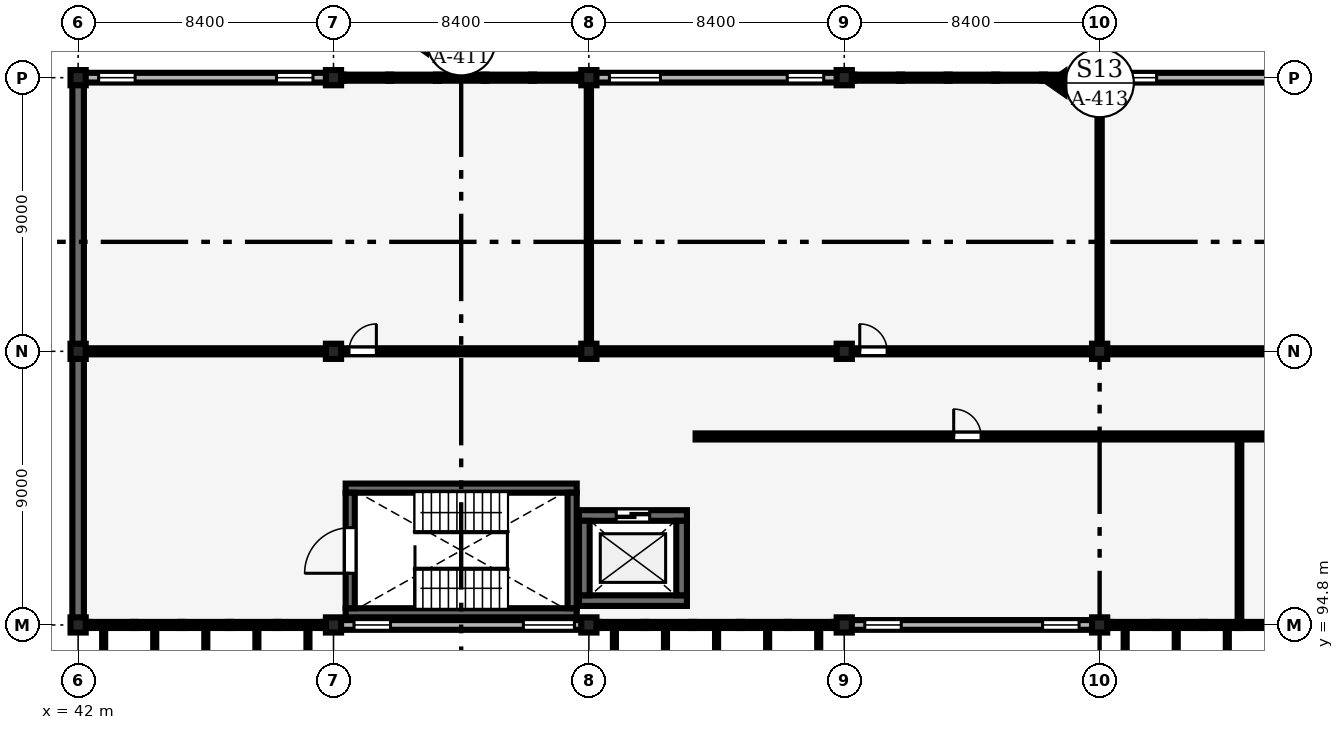
"""IFC4 building model, lengths in metres.
Left out: names, types, materials, properties, quantities, classifications, styles, units other than length and angle.
Written with IfcOpenShell. Run it as: python <this file> out.ifc"""

import sys

from ifc_helpers import new_model, si_unit, direction, frame, frame_2d, origin, origin_2d, place, context, subcontext, project, spatial, rectangle, extrude, element, fill, save


model = new_model("IFC4")
c1 = context("Model", 3, precision=1e-05, world=origin(), true_north=direction((0.0, 1.0)))
c2 = subcontext(c1, "Body", "Model", "MODEL_VIEW")
j1 = project(units=[si_unit("LENGTHUNIT", "METRE"), si_unit("PLANEANGLEUNIT", "RADIAN")], contexts=[c1])
p1 = place(None, origin())
s1 = spatial("IfcSite", under=j1, at=p1, CompositionType="ELEMENT")
p2 = place(p1, origin())
s2 = spatial("IfcBuilding", under=s1, at=p2, CompositionType="ELEMENT")
p3 = place(p2, frame((0.0, 0.0, 13.2)))
s3 = spatial("IfcBuildingStorey", under=s2, at=p3, CompositionType="ELEMENT", Elevation=13.2)
for number, where, z_axis, x_axis in (
    (1, (42.0, 94.8, 0.0), (0.0, 0.0, 1.0), (1.0, 0.0, 0.0)),
    (2, (42.0, 103.8, 0.0), (0.0, 0.0, 1.0), (1.0, 0.0, 0.0)),
    (3, (42.0, 112.8, 0.0), (0.0, 0.0, 1.0), (1.0, 0.0, 0.0)),
    (4, (50.4, 94.8, 0.0), (0.0, 0.0, 1.0), (1.0, 0.0, 0.0)),
    (5, (50.4, 103.8, 0.0), (0.0, 0.0, 1.0), (1.0, 0.0, 0.0)),
    (6, (50.4, 112.8, 0.0), (0.0, 0.0, 1.0), (1.0, 0.0, 0.0)),
    (7, (58.8, 94.8, 0.0), (0.0, 0.0, 1.0), (1.0, 0.0, 0.0)),
    (8, (58.8, 103.8, 0.0), (0.0, 0.0, 1.0), (1.0, 0.0, 0.0)),
    (9, (58.8, 112.8, 0.0), (0.0, 0.0, 1.0), (1.0, 0.0, 0.0)),
    (10, (67.2, 94.8, 0.0), (0.0, 0.0, 1.0), (1.0, 0.0, 0.0)),
    (11, (67.2, 103.8, 0.0), (0.0, 0.0, 1.0), (1.0, 0.0, 0.0)),
    (12, (67.2, 112.8, 0.0), (0.0, 0.0, 1.0), (1.0, 0.0, 0.0)),
    (13, (75.6, 94.8, 0.0), (0.0, 0.0, 1.0), (1.0, 0.0, 0.0)),
    (14, (75.6, 103.8, 0.0), (0.0, 0.0, 1.0), (1.0, 0.0, 0.0)),
    (15, (75.6, 112.8, 0.0), (0.0, 0.0, 1.0), (1.0, 0.0, 0.0)),
):
    element("IfcColumn", number, at=place(p3, frame(where, z_axis=z_axis, x_axis=x_axis)), inside=s3, PredefinedType="COLUMN", context=c2, shape_type="SweptSolid", body=[
        extrude(rectangle(XDim=0.5, YDim=0.5, at=origin_2d()), origin(), (0.0, 0.0, 1.0), 4.2),
    ])
p4 = place(p3, frame((42.225, 112.8, 0.0), z_axis=(0.0, 0.0, 1.0), x_axis=(1.0, 0.0, 0.0)))
e16 = element("IfcWall", 16, at=p4, inside=s3, PredefinedType="SOLIDWALL", context=c2, shape_type="SweptSolid", body=[
    extrude(rectangle(XDim=7.95, YDim=0.32, at=frame_2d((3.975, 0.0))), origin(), (0.0, 0.0, 1.0), 3.11),
])
p5 = place(p4, frame((0.45, 0.0, 0.9)))
e17 = element("IfcOpeningElement", 17, at=p5, cuts=e16, PredefinedType="OPENING", context=c2, shape_type="SweptSolid", body=[
    extrude(rectangle(XDim=1.2, YDim=1.5, at=frame_2d((0.6, 0.75))), frame((0.0, 0.17, 0.0), z_axis=(0.0, -1.0, 0.0), x_axis=(1.0, 0.0, 0.0)), (0.0, 0.0, 1.0), 0.34),
])
p6 = place(p4, frame((6.3, 0.0, 0.9)))
e18 = element("IfcOpeningElement", 18, at=p6, cuts=e16, PredefinedType="OPENING", context=c2, shape_type="SweptSolid", body=[
    extrude(rectangle(XDim=1.2, YDim=1.8, at=frame_2d((0.6, 0.9))), frame((0.0, 0.17, 0.0), z_axis=(0.0, -1.0, 0.0), x_axis=(1.0, 0.0, 0.0)), (0.0, 0.0, 1.0), 0.34),
])
p7 = place(p3, frame((59.025, 112.8, 0.0), z_axis=(0.0, 0.0, 1.0), x_axis=(1.0, 0.0, 0.0)))
e19 = element("IfcWall", 19, at=p7, inside=s3, PredefinedType="SOLIDWALL", context=c2, shape_type="SweptSolid", body=[
    extrude(rectangle(XDim=7.95, YDim=0.32, at=frame_2d((3.975, 0.0))), origin(), (0.0, 0.0, 1.0), 3.01),
])
p8 = place(p7, frame((0.45, 0.0, 0.9)))
e20 = element("IfcOpeningElement", 20, at=p8, cuts=e19, PredefinedType="OPENING", context=c2, shape_type="SweptSolid", body=[
    extrude(rectangle(XDim=1.68, YDim=1.96, at=frame_2d((0.84, 0.98))), frame((0.0, 0.17, 0.0), z_axis=(0.0, -1.0, 0.0), x_axis=(1.0, 0.0, 0.0)), (0.0, 0.0, 1.0), 0.34),
])
p9 = place(p7, frame((6.3, 0.0, 0.9)))
e21 = element("IfcOpeningElement", 21, at=p9, cuts=e19, PredefinedType="OPENING", context=c2, shape_type="SweptSolid", body=[
    extrude(rectangle(XDim=1.2, YDim=1.5, at=frame_2d((0.6, 0.75))), frame((0.0, 0.17, 0.0), z_axis=(0.0, -1.0, 0.0), x_axis=(1.0, 0.0, 0.0)), (0.0, 0.0, 1.0), 0.34),
])
p10 = place(p3, frame((75.825, 112.8, 0.0), z_axis=(0.0, 0.0, 1.0), x_axis=(1.0, 0.0, 0.0)))
e22 = element("IfcWall", 22, at=p10, inside=s3, PredefinedType="SOLIDWALL", context=c2, shape_type="SweptSolid", body=[
    extrude(rectangle(XDim=7.95, YDim=0.32, at=frame_2d((3.975, 0.0))), origin(), (0.0, 0.0, 1.0), 2.96),
])
p11 = place(p10, frame((0.45, 0.0, 0.9)))
e23 = element("IfcOpeningElement", 23, at=p11, cuts=e22, PredefinedType="OPENING", context=c2, shape_type="SweptSolid", body=[
    extrude(rectangle(XDim=1.2, YDim=1.8, at=frame_2d((0.6, 0.9))), frame((0.0, 0.17, 0.0), z_axis=(0.0, -1.0, 0.0), x_axis=(1.0, 0.0, 0.0)), (0.0, 0.0, 1.0), 0.34),
])
p12 = place(p10, frame((6.02, 0.0, 0.9)))
e24 = element("IfcOpeningElement", 24, at=p12, cuts=e22, PredefinedType="OPENING", context=c2, shape_type="SweptSolid", body=[
    extrude(rectangle(XDim=1.68, YDim=1.91, at=frame_2d((0.84, 0.955))), frame((0.0, 0.17, 0.0), z_axis=(0.0, -1.0, 0.0), x_axis=(1.0, 0.0, 0.0)), (0.0, 0.0, 1.0), 0.34),
])
p13 = place(p3, frame((42.0, 95.025, 0.0), z_axis=(0.0, 0.0, 1.0), x_axis=(0.0, 1.0, 0.0)))
e25 = element("IfcWall", 25, at=p13, inside=s3, PredefinedType="SHEAR", context=c2, shape_type="SweptSolid", body=[
    extrude(rectangle(XDim=8.55, YDim=0.38, at=frame_2d((4.275, 0.0))), origin(), (0.0, 0.0, 1.0), 3.01),
])
p14 = place(p3, frame((42.0, 104.025, 0.0), z_axis=(0.0, 0.0, 1.0), x_axis=(0.0, 1.0, 0.0)))
e26 = element("IfcWall", 26, at=p14, inside=s3, PredefinedType="SHEAR", context=c2, shape_type="SweptSolid", body=[
    extrude(rectangle(XDim=8.55, YDim=0.38, at=frame_2d((4.275, 0.0))), origin(), (0.0, 0.0, 1.0), 2.96),
])
p15 = place(p3, frame((50.625, 94.8, 0.0), z_axis=(0.0, 0.0, 1.0), x_axis=(1.0, 0.0, 0.0)))
e27 = element("IfcWall", 27, at=p15, inside=s3, PredefinedType="SOLIDWALL", context=c2, shape_type="SweptSolid", body=[
    extrude(rectangle(XDim=7.95, YDim=0.32, at=frame_2d((3.975, 0.0))), origin(), (0.0, 0.0, 1.0), 3.06),
])
p16 = place(p15, frame((0.45, 0.0, 0.9)))
e28 = element("IfcOpeningElement", 28, at=p16, cuts=e27, PredefinedType="OPENING", context=c2, shape_type="SweptSolid", body=[
    extrude(rectangle(XDim=1.2, YDim=1.8, at=frame_2d((0.6, 0.9))), frame((0.0, 0.17, 0.0), z_axis=(0.0, -1.0, 0.0), x_axis=(1.0, 0.0, 0.0)), (0.0, 0.0, 1.0), 0.34),
])
p17 = place(p15, frame((6.02, 0.0, 0.9)))
e29 = element("IfcOpeningElement", 29, at=p17, cuts=e27, PredefinedType="OPENING", context=c2, shape_type="SweptSolid", body=[
    extrude(rectangle(XDim=1.68, YDim=2.01, at=frame_2d((0.84, 1.005))), frame((0.0, 0.17, 0.0), z_axis=(0.0, -1.0, 0.0), x_axis=(1.0, 0.0, 0.0)), (0.0, 0.0, 1.0), 0.34),
])
p18 = place(p3, frame((67.425, 94.8, 0.0), z_axis=(0.0, 0.0, 1.0), x_axis=(1.0, 0.0, 0.0)))
e30 = element("IfcWall", 30, at=p18, inside=s3, PredefinedType="SOLIDWALL", context=c2, shape_type="SweptSolid", body=[
    extrude(rectangle(XDim=7.95, YDim=0.32, at=frame_2d((3.975, 0.0))), origin(), (0.0, 0.0, 1.0), 3.01),
])
p19 = place(p18, frame((0.45, 0.0, 0.9)))
e31 = element("IfcOpeningElement", 31, at=p19, cuts=e30, PredefinedType="OPENING", context=c2, shape_type="SweptSolid", body=[
    extrude(rectangle(XDim=1.2, YDim=1.5, at=frame_2d((0.6, 0.75))), frame((0.0, 0.17, 0.0), z_axis=(0.0, -1.0, 0.0), x_axis=(1.0, 0.0, 0.0)), (0.0, 0.0, 1.0), 0.34),
])
p20 = place(p18, frame((6.3, 0.0, 0.9)))
e32 = element("IfcOpeningElement", 32, at=p20, cuts=e30, PredefinedType="OPENING", context=c2, shape_type="SweptSolid", body=[
    extrude(rectangle(XDim=1.2, YDim=1.8, at=frame_2d((0.6, 0.9))), frame((0.0, 0.17, 0.0), z_axis=(0.0, -1.0, 0.0), x_axis=(1.0, 0.0, 0.0)), (0.0, 0.0, 1.0), 0.34),
])
for number, where, z_axis, x_axis in (
    (33, (50.8, 95.2, 0.0), (0.0, 0.0, 1.0), (1.0, 0.0, 0.0)),
    (34, (50.8, 99.3, 0.0), (0.0, 0.0, 1.0), (1.0, 0.0, 0.0)),
):
    element("IfcWall", number, at=place(p3, frame(where, z_axis=z_axis, x_axis=x_axis)), inside=s3, PredefinedType="SHEAR", context=c2, shape_type="SweptSolid", body=[
        extrude(rectangle(XDim=7.6, YDim=0.3, at=frame_2d((3.8, 0.0))), origin(), (0.0, 0.0, 1.0), 4.025),
    ])
p21 = place(p3, frame((50.95, 95.35, 0.0), z_axis=(0.0, 0.0, 1.0), x_axis=(0.0, 1.0, 0.0)))
e35 = element("IfcWall", 35, at=p21, inside=s3, PredefinedType="SHEAR", context=c2, shape_type="SweptSolid", body=[
    extrude(rectangle(XDim=3.8, YDim=0.3, at=frame_2d((1.9, 0.0))), origin(), (0.0, 0.0, 1.0), 4.025),
])
p22 = place(p21, frame((1.15, 0.0, 0.0)))
e36 = element("IfcOpeningElement", 36, at=p22, cuts=e35, PredefinedType="OPENING", context=c2, shape_type="SweptSolid", body=[
    extrude(rectangle(XDim=1.5, YDim=2.2, at=frame_2d((0.75, 1.1))), frame((0.0, 0.16, 0.0), z_axis=(0.0, -1.0, 0.0), x_axis=(1.0, 0.0, 0.0)), (0.0, 0.0, 1.0), 0.32),
])
p23 = place(p3, frame((58.25, 95.35, 0.0), z_axis=(0.0, 0.0, 1.0), x_axis=(0.0, 1.0, 0.0)))
e37 = element("IfcWall", 37, at=p23, inside=s3, PredefinedType="SHEAR", context=c2, shape_type="SweptSolid", body=[
    extrude(rectangle(XDim=3.8, YDim=0.3, at=frame_2d((1.9, 0.0))), origin(), (0.0, 0.0, 1.0), 4.025),
])
p24 = place(p3, frame((58.475, 95.6, 0.0), z_axis=(0.0, 0.0, 1.0), x_axis=(1.0, 0.0, 0.0)))
e38 = element("IfcWall", 38, at=p24, inside=s3, PredefinedType="SHEAR", context=c2, shape_type="SweptSolid", body=[
    extrude(rectangle(XDim=3.55, YDim=0.35, at=frame_2d((1.775, 0.0))), origin(), (0.0, 0.0, 1.0), 3.92),
])
p25 = place(p3, frame((58.475, 98.4, 0.0), z_axis=(0.0, 0.0, 1.0), x_axis=(1.0, 0.0, 0.0)))
e39 = element("IfcWall", 39, at=p25, inside=s3, PredefinedType="SHEAR", context=c2, shape_type="SweptSolid", body=[
    extrude(rectangle(XDim=3.55, YDim=0.35, at=frame_2d((1.775, 0.0))), origin(), (0.0, 0.0, 1.0), 3.92),
])
p26 = place(p25, frame((1.225, 0.0, 0.0)))
e40 = element("IfcOpeningElement", 40, at=p26, cuts=e39, PredefinedType="OPENING", context=c2, shape_type="SweptSolid", body=[
    extrude(rectangle(XDim=1.1, YDim=2.2, at=frame_2d((0.55, 1.1))), frame((0.0, 0.185, 0.0), z_axis=(0.0, -1.0, 0.0), x_axis=(1.0, 0.0, 0.0)), (0.0, 0.0, 1.0), 0.37),
])
for number, where, z_axis, x_axis in (
    (41, (58.65, 95.775, 0.0), (0.0, 0.0, 1.0), (0.0, 1.0, 0.0)),
    (42, (61.85, 95.775, 0.0), (0.0, 0.0, 1.0), (0.0, 1.0, 0.0)),
):
    element("IfcWall", number, at=place(p3, frame(where, z_axis=z_axis, x_axis=x_axis)), inside=s3, PredefinedType="SHEAR", context=c2, shape_type="SweptSolid", body=[
        extrude(rectangle(XDim=2.45, YDim=0.35, at=frame_2d((1.225, 0.0))), origin(), (0.0, 0.0, 1.0), 3.92),
    ])
p27 = place(p3, frame((58.8, 103.905, 0.0), z_axis=(0.0, 0.0, 1.0), x_axis=(0.0, 1.0, 0.0)))
e43 = element("IfcWall", 43, at=p27, inside=s3, PredefinedType="PARTITIONING", context=c2, shape_type="SweptSolid", body=[
    extrude(rectangle(XDim=8.79, YDim=0.14, at=frame_2d((4.395, 0.0))), origin(), (0.0, 0.0, 1.0), 3.01),
])
p28 = place(p3, frame((75.6, 103.905, 0.0), z_axis=(0.0, 0.0, 1.0), x_axis=(0.0, 1.0, 0.0)))
e44 = element("IfcWall", 44, at=p28, inside=s3, PredefinedType="PARTITIONING", context=c2, shape_type="SweptSolid", body=[
    extrude(rectangle(XDim=8.79, YDim=0.14, at=frame_2d((4.395, 0.0))), origin(), (0.0, 0.0, 1.0), 3.16),
])
p29 = place(p3, frame((42.195, 103.8, 0.0), z_axis=(0.0, 0.0, 1.0), x_axis=(1.0, 0.0, 0.0)))
e45 = element("IfcWall", 45, at=p29, inside=s3, PredefinedType="PARTITIONING", context=c2, shape_type="SweptSolid", body=[
    extrude(rectangle(XDim=7.945, YDim=0.2, at=frame_2d((3.972, 0.0))), origin(), (0.0, 0.0, 1.0), 3.31),
])
p30 = place(p3, frame((50.66, 103.8, 0.0), z_axis=(0.0, 0.0, 1.0), x_axis=(1.0, 0.0, 0.0)))
e46 = element("IfcWall", 46, at=p30, inside=s3, PredefinedType="PARTITIONING", context=c2, shape_type="SweptSolid", body=[
    extrude(rectangle(XDim=7.88, YDim=0.2, at=frame_2d((3.94, 0.0))), origin(), (0.0, 0.0, 1.0), 3.26),
])
p31 = place(p30, frame((0.25, 0.0, 0.0)))
e47 = element("IfcOpeningElement", 47, at=p31, cuts=e46, PredefinedType="OPENING", context=c2, shape_type="SweptSolid", body=[
    extrude(rectangle(XDim=0.9, YDim=2.1, at=frame_2d((0.45, 1.05))), frame((0.0, 0.11, 0.0), z_axis=(0.0, -1.0, 0.0), x_axis=(1.0, 0.0, 0.0)), (0.0, 0.0, 1.0), 0.22),
])
p32 = place(p3, frame((59.06, 103.8, 0.0), z_axis=(0.0, 0.0, 1.0), x_axis=(1.0, 0.0, 0.0)))
e48 = element("IfcWall", 48, at=p32, inside=s3, PredefinedType="PARTITIONING", context=c2, shape_type="SweptSolid", body=[
    extrude(rectangle(XDim=7.88, YDim=0.2, at=frame_2d((3.94, 0.0))), origin(), (0.0, 0.0, 1.0), 3.31),
])
p33 = place(p3, frame((67.46, 103.8, 0.0), z_axis=(0.0, 0.0, 1.0), x_axis=(1.0, 0.0, 0.0)))
e49 = element("IfcWall", 49, at=p33, inside=s3, PredefinedType="PARTITIONING", context=c2, shape_type="SweptSolid", body=[
    extrude(rectangle(XDim=7.88, YDim=0.2, at=frame_2d((3.94, 0.0))), origin(), (0.0, 0.0, 1.0), 3.26),
])
p34 = place(p33, frame((0.25, 0.0, 0.0)))
e50 = element("IfcOpeningElement", 50, at=p34, cuts=e49, PredefinedType="OPENING", context=c2, shape_type="SweptSolid", body=[
    extrude(rectangle(XDim=0.9, YDim=2.1, at=frame_2d((0.45, 1.05))), frame((0.0, 0.11, 0.0), z_axis=(0.0, -1.0, 0.0), x_axis=(1.0, 0.0, 0.0)), (0.0, 0.0, 1.0), 0.22),
])
p35 = place(p3, frame((75.86, 103.8, 0.0), z_axis=(0.0, 0.0, 1.0), x_axis=(1.0, 0.0, 0.0)))
e51 = element("IfcWall", 51, at=p35, inside=s3, PredefinedType="PARTITIONING", context=c2, shape_type="SweptSolid", body=[
    extrude(rectangle(XDim=7.88, YDim=0.2, at=frame_2d((3.94, 0.0))), origin(), (0.0, 0.0, 1.0), 3.21),
])
p36 = place(p35, frame((6.73, 0.0, 0.0)))
e52 = element("IfcOpeningElement", 52, at=p36, cuts=e51, PredefinedType="OPENING", context=c2, shape_type="SweptSolid", body=[
    extrude(rectangle(XDim=0.9, YDim=2.1, at=frame_2d((0.45, 1.05))), frame((0.0, 0.11, 0.0), z_axis=(0.0, -1.0, 0.0), x_axis=(1.0, 0.0, 0.0)), (0.0, 0.0, 1.0), 0.22),
])
p37 = place(p3, frame((80.2, 94.905, 0.0), z_axis=(0.0, 0.0, 1.0), x_axis=(0.0, 1.0, 0.0)))
e53 = element("IfcWall", 53, at=p37, inside=s3, PredefinedType="PARTITIONING", context=c2, shape_type="SweptSolid", body=[
    extrude(rectangle(XDim=5.99, YDim=0.12, at=frame_2d((2.995, 0.0))), origin(), (0.0, 0.0, 1.0), 3.9),
])
p38 = place(p3, frame((62.31, 101.0, 0.0), z_axis=(0.0, 0.0, 1.0), x_axis=(1.0, 0.0, 0.0)))
e54 = element("IfcWall", 54, at=p38, inside=s3, PredefinedType="PARTITIONING", context=c2, shape_type="SweptSolid", body=[
    extrude(rectangle(XDim=35.88, YDim=0.2, at=frame_2d((17.94, 0.0))), origin(), (0.0, 0.0, 1.0), 3.451),
])
p39 = place(p38, frame((8.49, 0.0, 0.0)))
e55 = element("IfcOpeningElement", 55, at=p39, cuts=e54, PredefinedType="OPENING", context=c2, shape_type="SweptSolid", body=[
    extrude(rectangle(XDim=0.9, YDim=2.1, at=frame_2d((0.45, 1.05))), frame((0.0, 0.11, 0.0), z_axis=(0.0, -1.0, 0.0), x_axis=(1.0, 0.0, 0.0)), (0.0, 0.0, 1.0), 0.22),
])
p40 = place(p38, frame((26.44, 0.0, 0.0)))
e56 = element("IfcOpeningElement", 56, at=p40, cuts=e54, PredefinedType="OPENING", context=c2, shape_type="SweptSolid", body=[
    extrude(rectangle(XDim=0.9, YDim=2.1, at=frame_2d((0.45, 1.05))), frame((0.0, 0.11, 0.0), z_axis=(0.0, -1.0, 0.0), x_axis=(1.0, 0.0, 0.0)), (0.0, 0.0, 1.0), 0.22),
])
p41 = place(p5, origin())
e57 = element("IfcWindow", 57, at=p41, inside=s3, PartitioningType="SINGLE_PANEL", PredefinedType="WINDOW", context=c2, shape_type="SweptSolid", body=[
    extrude(rectangle(XDim=1.2, YDim=1.5, at=frame_2d((0.6, 0.75))), frame((0.0, 0.03, 0.0), z_axis=(0.0, -1.0, 0.0), x_axis=(1.0, 0.0, 0.0)), (0.0, 0.0, 1.0), 0.06),
])
fill(e17, e57)
p42 = place(p6, origin())
e58 = element("IfcWindow", 58, at=p42, inside=s3, PartitioningType="SINGLE_PANEL", PredefinedType="WINDOW", context=c2, shape_type="SweptSolid", body=[
    extrude(rectangle(XDim=1.2, YDim=1.8, at=frame_2d((0.6, 0.9))), frame((0.0, 0.03, 0.0), z_axis=(0.0, -1.0, 0.0), x_axis=(1.0, 0.0, 0.0)), (0.0, 0.0, 1.0), 0.06),
])
fill(e18, e58)
p43 = place(p8, origin())
e59 = element("IfcWindow", 59, at=p43, inside=s3, PartitioningType="SINGLE_PANEL", PredefinedType="WINDOW", context=c2, shape_type="SweptSolid", body=[
    extrude(rectangle(XDim=1.68, YDim=1.96, at=frame_2d((0.84, 0.98))), frame((0.0, 0.03, 0.0), z_axis=(0.0, -1.0, 0.0), x_axis=(1.0, 0.0, 0.0)), (0.0, 0.0, 1.0), 0.06),
])
fill(e20, e59)
p44 = place(p9, origin())
e60 = element("IfcWindow", 60, at=p44, inside=s3, PartitioningType="SINGLE_PANEL", PredefinedType="WINDOW", context=c2, shape_type="SweptSolid", body=[
    extrude(rectangle(XDim=1.2, YDim=1.5, at=frame_2d((0.6, 0.75))), frame((0.0, 0.03, 0.0), z_axis=(0.0, -1.0, 0.0), x_axis=(1.0, 0.0, 0.0)), (0.0, 0.0, 1.0), 0.06),
])
fill(e21, e60)
p45 = place(p11, origin())
e61 = element("IfcWindow", 61, at=p45, inside=s3, PartitioningType="SINGLE_PANEL", PredefinedType="WINDOW", context=c2, shape_type="SweptSolid", body=[
    extrude(rectangle(XDim=1.2, YDim=1.8, at=frame_2d((0.6, 0.9))), frame((0.0, 0.03, 0.0), z_axis=(0.0, -1.0, 0.0), x_axis=(1.0, 0.0, 0.0)), (0.0, 0.0, 1.0), 0.06),
])
fill(e23, e61)
p46 = place(p16, origin())
e62 = element("IfcWindow", 62, at=p46, inside=s3, PartitioningType="SINGLE_PANEL", PredefinedType="WINDOW", context=c2, shape_type="SweptSolid", body=[
    extrude(rectangle(XDim=1.2, YDim=1.8, at=frame_2d((0.6, 0.9))), frame((0.0, 0.03, 0.0), z_axis=(0.0, -1.0, 0.0), x_axis=(1.0, 0.0, 0.0)), (0.0, 0.0, 1.0), 0.06),
])
fill(e28, e62)
p47 = place(p17, origin())
e63 = element("IfcWindow", 63, at=p47, inside=s3, PartitioningType="SINGLE_PANEL", PredefinedType="WINDOW", context=c2, shape_type="SweptSolid", body=[
    extrude(rectangle(XDim=1.68, YDim=2.01, at=frame_2d((0.84, 1.005))), frame((0.0, 0.03, 0.0), z_axis=(0.0, -1.0, 0.0), x_axis=(1.0, 0.0, 0.0)), (0.0, 0.0, 1.0), 0.06),
])
fill(e29, e63)
p48 = place(p19, origin())
e64 = element("IfcWindow", 64, at=p48, inside=s3, PartitioningType="SINGLE_PANEL", PredefinedType="WINDOW", context=c2, shape_type="SweptSolid", body=[
    extrude(rectangle(XDim=1.2, YDim=1.5, at=frame_2d((0.6, 0.75))), frame((0.0, 0.03, 0.0), z_axis=(0.0, -1.0, 0.0), x_axis=(1.0, 0.0, 0.0)), (0.0, 0.0, 1.0), 0.06),
])
fill(e31, e64)
p49 = place(p20, origin())
e65 = element("IfcWindow", 65, at=p49, inside=s3, PartitioningType="SINGLE_PANEL", PredefinedType="WINDOW", context=c2, shape_type="SweptSolid", body=[
    extrude(rectangle(XDim=1.2, YDim=1.8, at=frame_2d((0.6, 0.9))), frame((0.0, 0.03, 0.0), z_axis=(0.0, -1.0, 0.0), x_axis=(1.0, 0.0, 0.0)), (0.0, 0.0, 1.0), 0.06),
])
fill(e32, e65)
p50 = place(p22, origin())
e66 = element("IfcDoor", 66, at=p50, inside=s3, OperationType="DOUBLE_DOOR_SINGLE_SWING", PredefinedType="DOOR", context=c2, shape_type="SweptSolid", body=[
    extrude(rectangle(XDim=1.5, YDim=2.2, at=frame_2d((0.75, 1.1))), frame((0.0, 0.025, 0.0), z_axis=(0.0, -1.0, 0.0), x_axis=(1.0, 0.0, 0.0)), (0.0, 0.0, 1.0), 0.05),
])
fill(e36, e66)
p51 = place(p26, origin())
e67 = element("IfcDoor", 67, at=p51, inside=s3, OperationType="DOUBLE_DOOR_SLIDING", PredefinedType="DOOR", context=c2, shape_type="SweptSolid", body=[
    extrude(rectangle(XDim=1.1, YDim=2.2, at=frame_2d((0.55, 1.1))), frame((0.0, 0.025, 0.0), z_axis=(0.0, -1.0, 0.0), x_axis=(1.0, 0.0, 0.0)), (0.0, 0.0, 1.0), 0.05),
])
fill(e40, e67)
p52 = place(p31, origin())
e68 = element("IfcDoor", 68, at=p52, inside=s3, OperationType="SINGLE_SWING_RIGHT", PredefinedType="DOOR", context=c2, shape_type="SweptSolid", body=[
    extrude(rectangle(XDim=0.9, YDim=2.1, at=frame_2d((0.45, 1.05))), frame((0.0, 0.025, 0.0), z_axis=(0.0, -1.0, 0.0), x_axis=(1.0, 0.0, 0.0)), (0.0, 0.0, 1.0), 0.05),
])
fill(e47, e68)
p53 = place(p34, origin())
e69 = element("IfcDoor", 69, at=p53, inside=s3, OperationType="SINGLE_SWING_LEFT", PredefinedType="DOOR", context=c2, shape_type="SweptSolid", body=[
    extrude(rectangle(XDim=0.9, YDim=2.1, at=frame_2d((0.45, 1.05))), frame((0.0, 0.025, 0.0), z_axis=(0.0, -1.0, 0.0), x_axis=(1.0, 0.0, 0.0)), (0.0, 0.0, 1.0), 0.05),
])
fill(e50, e69)
p54 = place(p39, origin())
e70 = element("IfcDoor", 70, at=p54, inside=s3, OperationType="SINGLE_SWING_LEFT", PredefinedType="DOOR", context=c2, shape_type="SweptSolid", body=[
    extrude(rectangle(XDim=0.9, YDim=2.1, at=frame_2d((0.45, 1.05))), frame((0.0, 0.025, 0.0), z_axis=(0.0, -1.0, 0.0), x_axis=(1.0, 0.0, 0.0)), (0.0, 0.0, 1.0), 0.05),
])
fill(e55, e70)
save(model, sys.argv[1])
